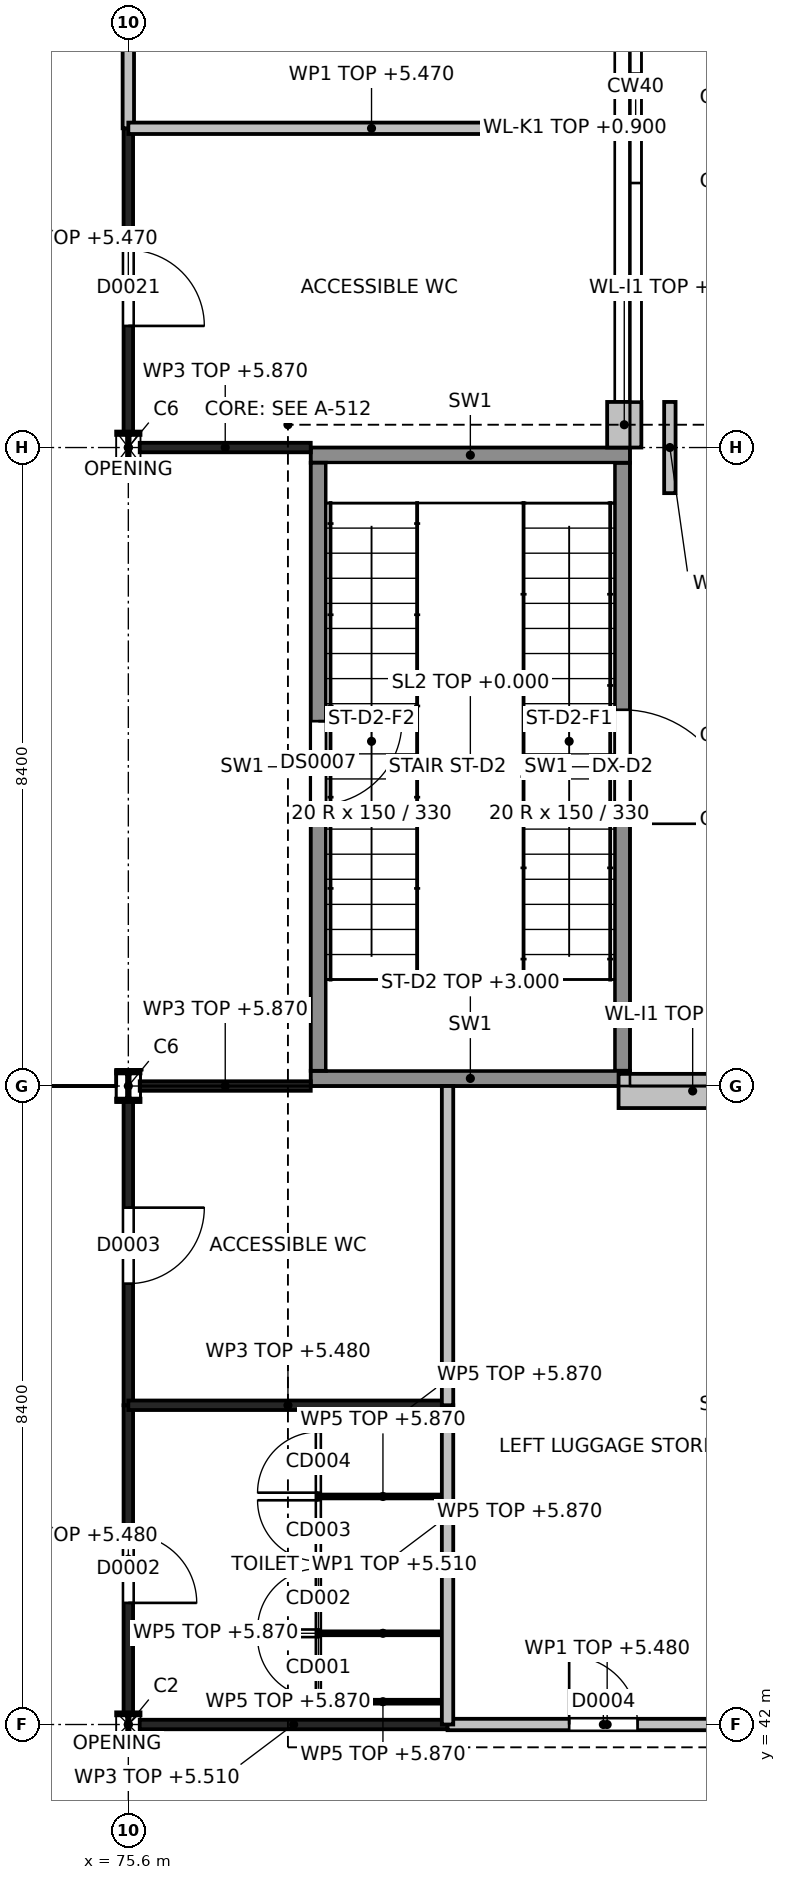
"""IFC4 building model, lengths in metres.
Left out: names, types, materials, properties, quantities, classifications, styles, units other than length and angle.
Written with IfcOpenShell. Run it as: python <this file> out.ifc"""

import sys

from ifc_helpers import new_model, si_unit, direction, frame, frame_2d, origin, origin_2d, place, context, subcontext, project, spatial, rectangle, i_section, extrude, element, fill, save


model = new_model("IFC4")
c1 = context("Model", 3, precision=1e-05, world=origin(), true_north=direction((0.0, 1.0)))
c2 = subcontext(c1, "Body", "Model", "MODEL_VIEW")
j1 = project(units=[si_unit("LENGTHUNIT", "METRE"), si_unit("PLANEANGLEUNIT", "RADIAN")], contexts=[c1])
p1 = place(None, origin())
s1 = spatial("IfcSite", under=j1, at=p1, CompositionType="ELEMENT")
p2 = place(p1, origin())
s2 = spatial("IfcBuilding", under=s1, at=p2, CompositionType="ELEMENT")
p3 = place(p2, origin())
s3 = spatial("IfcBuildingStorey", under=s2, at=p3, CompositionType="ELEMENT", Elevation=0.0)
p4 = place(p3, frame((75.6, 42.0, -1.35), z_axis=(0.0, 0.0, 1.0), x_axis=(1.0, 0.0, 0.0)))
e1 = element("IfcColumn", 1, at=p4, inside=s3, PredefinedType="COLUMN", context=c2, shape_type="SweptSolid", body=[
    extrude(i_section(OverallWidth=0.3, OverallDepth=0.3, WebThickness=0.011, FlangeThickness=0.019, at=origin_2d()), origin(), (0.0, 0.0, 1.0), 7.35),
])
for number, where, z_axis, x_axis in (
    (2, (75.6, 50.4, -1.35), (0.0, 0.0, 1.0), (1.0, 0.0, 0.0)),
    (3, (75.6, 58.8, -1.35), (0.0, 0.0, 1.0), (1.0, 0.0, 0.0)),
):
    element("IfcColumn", number, at=place(p3, frame(where, z_axis=z_axis, x_axis=x_axis)), inside=s3, PredefinedType="COLUMN", context=c2, shape_type="SweptSolid", body=[
        extrude(i_section(OverallWidth=0.3, OverallDepth=0.4, WebThickness=0.013, FlangeThickness=0.024, at=origin_2d()), origin(), (0.0, 0.0, 1.0), 7.35),
    ])
for number, where, z_axis, x_axis in (
    (4, (78.0, 50.5, -1.35), (0.0, 0.0, 1.0), (1.0, 0.0, 0.0)),
    (5, (78.0, 58.7, -1.35), (0.0, 0.0, 1.0), (1.0, 0.0, 0.0)),
):
    element("IfcWall", number, at=place(p3, frame(where, z_axis=z_axis, x_axis=x_axis)), inside=s3, PredefinedType="SHEAR", context=c2, shape_type="SweptSolid", body=[
        extrude(rectangle(XDim=4.2, YDim=0.2, at=frame_2d((2.1, 0.0))), origin(), (0.0, 0.0, 1.0), 7.35),
    ])
p5 = place(p3, frame((78.1, 50.6, -1.35), z_axis=(0.0, 0.0, 1.0), x_axis=(0.0, 1.0, 0.0)))
e6 = element("IfcWall", 6, at=p5, inside=s3, PredefinedType="SHEAR", context=c2, shape_type="SweptSolid", body=[
    extrude(rectangle(XDim=8.0, YDim=0.2, at=frame_2d((4.0, 0.0))), origin(), (0.0, 0.0, 1.0), 7.35),
])
p6 = place(p5, frame((3.5, 0.0, 1.35)))
e7 = element("IfcOpeningElement", 7, at=p6, cuts=e6, PredefinedType="OPENING", context=c2, shape_type="SweptSolid", body=[
    extrude(rectangle(XDim=1.1, YDim=2.1, at=frame_2d((0.55, 1.05))), frame((0.0, 0.1, 0.0), z_axis=(0.0, -1.0, 0.0), x_axis=(1.0, 0.0, 0.0)), (0.0, 0.0, 1.0), 0.2),
])
p7 = place(p3, frame((82.1, 50.6, -1.35), z_axis=(0.0, 0.0, 1.0), x_axis=(0.0, 1.0, 0.0)))
e8 = element("IfcWall", 8, at=p7, inside=s3, PredefinedType="SHEAR", context=c2, shape_type="SweptSolid", body=[
    extrude(rectangle(XDim=8.0, YDim=0.2, at=frame_2d((4.0, 0.0))), origin(), (0.0, 0.0, 1.0), 7.35),
])
p8 = place(p7, frame((3.25, 0.0, 1.35)))
e9 = element("IfcOpeningElement", 9, at=p8, cuts=e8, PredefinedType="OPENING", context=c2, shape_type="SweptSolid", body=[
    extrude(rectangle(XDim=1.5, YDim=2.4, at=frame_2d((0.75, 1.2))), frame((0.0, 0.1, 0.0), z_axis=(0.0, -1.0, 0.0), x_axis=(1.0, 0.0, 0.0)), (0.0, 0.0, 1.0), 0.2),
])
p9 = place(p3, frame((82.05, 50.335, 0.0), z_axis=(0.0, 0.0, 1.0), x_axis=(1.0, 0.0, 0.0)))
e10 = element("IfcWall", 10, at=p9, inside=s3, PredefinedType="SOLIDWALL", context=c2, shape_type="SweptSolid", body=[
    extrude(rectangle(XDim=1.95, YDim=0.45, at=frame_2d((0.975, 0.0))), origin(), (0.0, 0.0, 1.0), 5.25),
])
p10 = place(p3, frame((82.175, 59.4, 0.0), z_axis=(0.0, 0.0, 1.0), x_axis=(0.0, 1.0, 0.0)))
e11 = element("IfcWall", 11, at=p10, inside=s3, PredefinedType="SOLIDWALL", context=c2, shape_type="SweptSolid", body=[
    extrude(rectangle(XDim=7.2, YDim=0.35, at=frame_2d((3.6, 0.0))), origin(), (0.0, 0.0, 1.0), 0.9),
])
p11 = place(p3, frame((82.125, 58.8, 0.0), z_axis=(0.0, 0.0, 1.0), x_axis=(0.0, 1.0, 0.0)))
e12 = element("IfcWall", 12, at=p11, inside=s3, PredefinedType="SOLIDWALL", context=c2, shape_type="SweptSolid", body=[
    extrude(rectangle(XDim=0.6, YDim=0.45, at=frame_2d((0.3, 0.0))), origin(), (0.0, 0.0, 1.0), 5.4),
])
p12 = place(p3, frame((82.725, 58.2, 0.0), z_axis=(0.0, 0.0, 1.0), x_axis=(0.0, 1.0, 0.0)))
e13 = element("IfcWall", 13, at=p12, inside=s3, PredefinedType="SOLIDWALL", context=c2, shape_type="SweptSolid", body=[
    extrude(rectangle(XDim=1.2, YDim=0.15, at=frame_2d((0.6, 0.0))), origin(), (0.0, 0.0, 1.0), 6.0),
])
p13 = place(p3, frame((75.6, 42.15, 0.0), z_axis=(0.0, 0.0, 1.0), x_axis=(0.0, 1.0, 0.0)))
e14 = element("IfcWall", 14, at=p13, inside=s3, PredefinedType="PARTITIONING", context=c2, shape_type="SweptSolid", body=[
    extrude(rectangle(XDim=4.05, YDim=0.125, at=frame_2d((2.025, 0.0))), origin(), (0.0, 0.0, 1.0), 5.48),
])
p14 = place(p13, frame((1.45, 0.0, 0.0)))
e15 = element("IfcOpeningElement", 15, at=p14, cuts=e14, PredefinedType="OPENING", context=c2, shape_type="SweptSolid", body=[
    extrude(rectangle(XDim=0.9, YDim=2.1, at=frame_2d((0.45, 1.05))), frame((0.0, 0.062, 0.0), z_axis=(0.0, -1.0, 0.0), x_axis=(1.0, 0.0, 0.0)), (0.0, 0.0, 1.0), 0.125),
])
p15 = place(p3, frame((75.6, 46.2, 0.0), z_axis=(0.0, 0.0, 1.0), x_axis=(0.0, 1.0, 0.0)))
e16 = element("IfcWall", 16, at=p15, inside=s3, PredefinedType="PARTITIONING", context=c2, shape_type="SweptSolid", body=[
    extrude(rectangle(XDim=4.0, YDim=0.125, at=frame_2d((2.0, 0.0))), origin(), (0.0, 0.0, 1.0), 5.48),
])
p16 = place(p15, frame((1.6, 0.0, 0.0)))
e17 = element("IfcOpeningElement", 17, at=p16, cuts=e16, PredefinedType="OPENING", context=c2, shape_type="SweptSolid", body=[
    extrude(rectangle(XDim=1.0, YDim=2.1, at=frame_2d((0.5, 1.05))), frame((0.0, 0.062, 0.0), z_axis=(0.0, -1.0, 0.0), x_axis=(1.0, 0.0, 0.0)), (0.0, 0.0, 1.0), 0.125),
])
p17 = place(p3, frame((75.75, 42.0, 0.0), z_axis=(0.0, 0.0, 1.0), x_axis=(1.0, 0.0, 0.0)))
e18 = element("IfcWall", 18, at=p17, inside=s3, PredefinedType="PARTITIONING", context=c2, shape_type="SweptSolid", body=[
    extrude(rectangle(XDim=4.05, YDim=0.125, at=frame_2d((2.025, 0.0))), origin(), (0.0, 0.0, 1.0), 5.51),
])
p18 = place(p3, frame((79.8, 42.0, 0.0), z_axis=(0.0, 0.0, 1.0), x_axis=(1.0, 0.0, 0.0)))
e19 = element("IfcWall", 19, at=p18, inside=s3, PredefinedType="PARTITIONING", context=c2, shape_type="SweptSolid", body=[
    extrude(rectangle(XDim=4.2, YDim=0.15, at=frame_2d((2.1, 0.0))), origin(), (0.0, 0.0, 1.0), 5.48),
])
p19 = place(p18, frame((1.6, 0.0, 0.0)))
e20 = element("IfcOpeningElement", 20, at=p19, cuts=e19, PredefinedType="OPENING", context=c2, shape_type="SweptSolid", body=[
    extrude(rectangle(XDim=0.9, YDim=2.1, at=frame_2d((0.45, 1.05))), frame((0.0, 0.075, 0.0), z_axis=(0.0, -1.0, 0.0), x_axis=(1.0, 0.0, 0.0)), (0.0, 0.0, 1.0), 0.15),
])
p20 = place(p3, frame((75.6, 46.2, 0.0), z_axis=(0.0, 0.0, 1.0), x_axis=(1.0, 0.0, 0.0)))
e21 = element("IfcWall", 21, at=p20, inside=s3, PredefinedType="PARTITIONING", context=c2, shape_type="SweptSolid", body=[
    extrude(rectangle(XDim=4.2, YDim=0.125, at=frame_2d((2.1, 0.0))), origin(), (0.0, 0.0, 1.0), 5.48),
])
for number, where, z_axis, x_axis in (
    (22, (79.8, 42.0, 0.0), (0.0, 0.0, 1.0), (0.0, 1.0, 0.0)),
    (23, (79.8, 46.2, 0.0), (0.0, 0.0, 1.0), (0.0, 1.0, 0.0)),
):
    element("IfcWall", number, at=place(p3, frame(where, z_axis=z_axis, x_axis=x_axis)), inside=s3, PredefinedType="PARTITIONING", context=c2, shape_type="SweptSolid", body=[
        extrude(rectangle(XDim=4.2, YDim=0.15, at=frame_2d((2.1, 0.0))), origin(), (0.0, 0.0, 1.0), 5.51),
    ])
for number, where, z_axis, x_axis in (
    (24, (75.75, 50.4, 0.0), (0.0, 0.0, 1.0), (1.0, 0.0, 0.0)),
    (25, (75.75, 58.8, 0.0), (0.0, 0.0, 1.0), (1.0, 0.0, 0.0)),
):
    element("IfcWall", number, at=place(p3, frame(where, z_axis=z_axis, x_axis=x_axis)), inside=s3, PredefinedType="PARTITIONING", context=c2, shape_type="SweptSolid", body=[
        extrude(rectangle(XDim=2.25, YDim=0.125, at=frame_2d((1.125, 0.0))), origin(), (0.0, 0.0, 1.0), 5.87),
    ])
p21 = place(p3, frame((75.6, 59.0, 0.0), z_axis=(0.0, 0.0, 1.0), x_axis=(0.0, 1.0, 0.0)))
e26 = element("IfcWall", 26, at=p21, inside=s3, PredefinedType="PARTITIONING", context=c2, shape_type="SweptSolid", body=[
    extrude(rectangle(XDim=4.0, YDim=0.125, at=frame_2d((2.0, 0.0))), origin(), (0.0, 0.0, 1.0), 5.47),
])
p22 = place(p21, frame((1.4, 0.0, 0.0)))
e27 = element("IfcOpeningElement", 27, at=p22, cuts=e26, PredefinedType="OPENING", context=c2, shape_type="SweptSolid", body=[
    extrude(rectangle(XDim=1.0, YDim=2.1, at=frame_2d((0.5, 1.05))), frame((0.0, 0.062, 0.0), z_axis=(0.0, -1.0, 0.0), x_axis=(1.0, 0.0, 0.0)), (0.0, 0.0, 1.0), 0.125),
])
p23 = place(p3, frame((75.6, 63.0, 0.0), z_axis=(0.0, 0.0, 1.0), x_axis=(0.0, 1.0, 0.0)))
e28 = element("IfcWall", 28, at=p23, inside=s3, PredefinedType="PARTITIONING", context=c2, shape_type="SweptSolid", body=[
    extrude(rectangle(XDim=4.055, YDim=0.15, at=frame_2d((2.027, 0.0))), origin(), (0.0, 0.0, 1.0), 5.47),
])
p24 = place(p23, frame((2.95, 0.0, 0.0)))
e29 = element("IfcOpeningElement", 29, at=p24, cuts=e28, PredefinedType="OPENING", context=c2, shape_type="SweptSolid", body=[
    extrude(rectangle(XDim=0.9, YDim=2.1, at=frame_2d((0.45, 1.05))), frame((0.0, 0.075, 0.0), z_axis=(0.0, -1.0, 0.0), x_axis=(1.0, 0.0, 0.0)), (0.0, 0.0, 1.0), 0.15),
])
p25 = place(p3, frame((75.6, 63.0, 0.0), z_axis=(0.0, 0.0, 1.0), x_axis=(1.0, 0.0, 0.0)))
e30 = element("IfcWall", 30, at=p25, inside=s3, PredefinedType="PARTITIONING", context=c2, shape_type="SweptSolid", body=[
    extrude(rectangle(XDim=6.399, YDim=0.15, at=frame_2d((3.2, 0.0))), origin(), (0.0, 0.0, 1.0), 5.47),
])
p26 = place(p3, frame((78.1, 42.3, 0.0), z_axis=(0.0, 0.0, 1.0), x_axis=(0.0, 1.0, 0.0)))
e31 = element("IfcWall", 31, at=p26, inside=s3, PredefinedType="PARTITIONING", context=c2, shape_type="SweptSolid", body=[
    extrude(rectangle(XDim=3.6, YDim=0.05, at=frame_2d((1.8, 0.0))), origin(), (0.0, 0.0, 1.0), 5.87),
])
p27 = place(p26, frame((0.05, 0.0, 0.0)))
e32 = element("IfcOpeningElement", 32, at=p27, cuts=e31, PredefinedType="OPENING", context=c2, shape_type="SweptSolid", body=[
    extrude(rectangle(XDim=0.8, YDim=2.0, at=frame_2d((0.4, 1.0))), frame((0.0, 0.025, 0.0), z_axis=(0.0, -1.0, 0.0), x_axis=(1.0, 0.0, 0.0)), (0.0, 0.0, 1.0), 0.05),
])
p28 = place(p26, frame((0.95, 0.0, 0.0)))
e33 = element("IfcOpeningElement", 33, at=p28, cuts=e31, PredefinedType="OPENING", context=c2, shape_type="SweptSolid", body=[
    extrude(rectangle(XDim=0.8, YDim=2.0, at=frame_2d((0.4, 1.0))), frame((0.0, 0.025, 0.0), z_axis=(0.0, -1.0, 0.0), x_axis=(1.0, 0.0, 0.0)), (0.0, 0.0, 1.0), 0.05),
])
p29 = place(p26, frame((1.85, 0.0, 0.0)))
e34 = element("IfcOpeningElement", 34, at=p29, cuts=e31, PredefinedType="OPENING", context=c2, shape_type="SweptSolid", body=[
    extrude(rectangle(XDim=0.8, YDim=2.0, at=frame_2d((0.4, 1.0))), frame((0.0, 0.025, 0.0), z_axis=(0.0, -1.0, 0.0), x_axis=(1.0, 0.0, 0.0)), (0.0, 0.0, 1.0), 0.05),
])
p30 = place(p26, frame((2.75, 0.0, 0.0)))
e35 = element("IfcOpeningElement", 35, at=p30, cuts=e31, PredefinedType="OPENING", context=c2, shape_type="SweptSolid", body=[
    extrude(rectangle(XDim=0.8, YDim=2.0, at=frame_2d((0.4, 1.0))), frame((0.0, 0.025, 0.0), z_axis=(0.0, -1.0, 0.0), x_axis=(1.0, 0.0, 0.0)), (0.0, 0.0, 1.0), 0.05),
])
for number, where, z_axis, x_axis in (
    (36, (79.8, 42.3, 0.0), (0.0, 0.0, 1.0), (-1.0, 0.0, 0.0)),
    (37, (79.8, 43.2, 0.0), (0.0, 0.0, 1.0), (-1.0, 0.0, 0.0)),
    (38, (79.8, 44.1, 0.0), (0.0, 0.0, 1.0), (-1.0, 0.0, 0.0)),
    (39, (79.8, 45.0, 0.0), (0.0, 0.0, 1.0), (-1.0, 0.0, 0.0)),
    (40, (79.8, 45.9, 0.0), (0.0, 0.0, 1.0), (-1.0, 0.0, 0.0)),
):
    element("IfcWall", number, at=place(p3, frame(where, z_axis=z_axis, x_axis=x_axis)), inside=s3, PredefinedType="PARTITIONING", context=c2, shape_type="SweptSolid", body=[
        extrude(rectangle(XDim=1.7, YDim=0.05, at=frame_2d((0.85, 0.0))), origin(), (0.0, 0.0, 1.0), 5.87),
    ])
p31 = place(p8, frame((1.5, 0.05, 0.0), z_axis=(0.0, 0.0, 1.0), x_axis=(-1.0, 0.0, 0.0)))
e41 = element("IfcDoor", 41, at=p31, inside=s3, OperationType="DOUBLE_DOOR_SINGLE_SWING", PredefinedType="DOOR", context=c2, shape_type="SweptSolid", body=[
    extrude(rectangle(XDim=1.5, YDim=2.4, at=frame_2d((0.75, 1.2))), frame((0.0, 0.025, 0.0), z_axis=(0.0, -1.0, 0.0), x_axis=(1.0, 0.0, 0.0)), (0.0, 0.0, 1.0), 0.05),
])
fill(e9, e41)
p32 = place(p14, origin())
e42 = element("IfcDoor", 42, at=p32, inside=s3, OperationType="SINGLE_SWING_LEFT", PredefinedType="DOOR", context=c2, shape_type="SweptSolid", body=[
    extrude(rectangle(XDim=0.9, YDim=2.1, at=frame_2d((0.45, 1.05))), frame((0.0, 0.025, 0.0), z_axis=(0.0, -1.0, 0.0), x_axis=(1.0, 0.0, 0.0)), (0.0, 0.0, 1.0), 0.05),
])
fill(e15, e42)
p33 = place(p16, origin())
e43 = element("IfcDoor", 43, at=p33, inside=s3, OperationType="SINGLE_SWING_RIGHT", PredefinedType="DOOR", context=c2, shape_type="SweptSolid", body=[
    extrude(rectangle(XDim=1.0, YDim=2.1, at=frame_2d((0.5, 1.05))), frame((0.0, 0.025, 0.0), z_axis=(0.0, -1.0, 0.0), x_axis=(1.0, 0.0, 0.0)), (0.0, 0.0, 1.0), 0.05),
])
fill(e17, e43)
p34 = place(p19, origin())
e44 = element("IfcDoor", 44, at=p34, inside=s3, OperationType="SINGLE_SWING_LEFT", PredefinedType="DOOR", context=c2, shape_type="SweptSolid", body=[
    extrude(rectangle(XDim=0.9, YDim=2.1, at=frame_2d((0.45, 1.05))), frame((0.0, 0.025, 0.0), z_axis=(0.0, -1.0, 0.0), x_axis=(1.0, 0.0, 0.0)), (0.0, 0.0, 1.0), 0.05),
])
fill(e20, e44)
p35 = place(p22, origin())
e45 = element("IfcDoor", 45, at=p35, inside=s3, OperationType="SINGLE_SWING_LEFT", PredefinedType="DOOR", context=c2, shape_type="SweptSolid", body=[
    extrude(rectangle(XDim=1.0, YDim=2.1, at=frame_2d((0.5, 1.05))), frame((0.0, 0.025, 0.0), z_axis=(0.0, -1.0, 0.0), x_axis=(1.0, 0.0, 0.0)), (0.0, 0.0, 1.0), 0.05),
])
fill(e27, e45)
p36 = place(p6, origin())
e46 = element("IfcDoor", 46, at=p36, inside=s3, OperationType="SINGLE_SWING_RIGHT", PredefinedType="DOOR", context=c2, shape_type="SweptSolid", body=[
    extrude(rectangle(XDim=1.1, YDim=2.1, at=frame_2d((0.55, 1.05))), frame((0.0, 0.025, 0.0), z_axis=(0.0, -1.0, 0.0), x_axis=(1.0, 0.0, 0.0)), (0.0, 0.0, 1.0), 0.05),
])
fill(e7, e46)
p37 = place(p27, origin())
e47 = element("IfcDoor", 47, at=p37, inside=s3, OperationType="SINGLE_SWING_RIGHT", PredefinedType="DOOR", context=c2, shape_type="SweptSolid", body=[
    extrude(rectangle(XDim=0.8, YDim=2.0, at=frame_2d((0.4, 1.0))), frame((0.0, 0.025, 0.0), z_axis=(0.0, -1.0, 0.0), x_axis=(1.0, 0.0, 0.0)), (0.0, 0.0, 1.0), 0.05),
])
fill(e32, e47)
p38 = place(p28, origin())
e48 = element("IfcDoor", 48, at=p38, inside=s3, OperationType="SINGLE_SWING_LEFT", PredefinedType="DOOR", context=c2, shape_type="SweptSolid", body=[
    extrude(rectangle(XDim=0.8, YDim=2.0, at=frame_2d((0.4, 1.0))), frame((0.0, 0.025, 0.0), z_axis=(0.0, -1.0, 0.0), x_axis=(1.0, 0.0, 0.0)), (0.0, 0.0, 1.0), 0.05),
])
fill(e33, e48)
p39 = place(p29, origin())
e49 = element("IfcDoor", 49, at=p39, inside=s3, OperationType="SINGLE_SWING_RIGHT", PredefinedType="DOOR", context=c2, shape_type="SweptSolid", body=[
    extrude(rectangle(XDim=0.8, YDim=2.0, at=frame_2d((0.4, 1.0))), frame((0.0, 0.025, 0.0), z_axis=(0.0, -1.0, 0.0), x_axis=(1.0, 0.0, 0.0)), (0.0, 0.0, 1.0), 0.05),
])
fill(e34, e49)
p40 = place(p30, origin())
e50 = element("IfcDoor", 50, at=p40, inside=s3, OperationType="SINGLE_SWING_LEFT", PredefinedType="DOOR", context=c2, shape_type="SweptSolid", body=[
    extrude(rectangle(XDim=0.8, YDim=2.0, at=frame_2d((0.4, 1.0))), frame((0.0, 0.025, 0.0), z_axis=(0.0, -1.0, 0.0), x_axis=(1.0, 0.0, 0.0)), (0.0, 0.0, 1.0), 0.05),
])
fill(e35, e50)
save(model, sys.argv[1])
